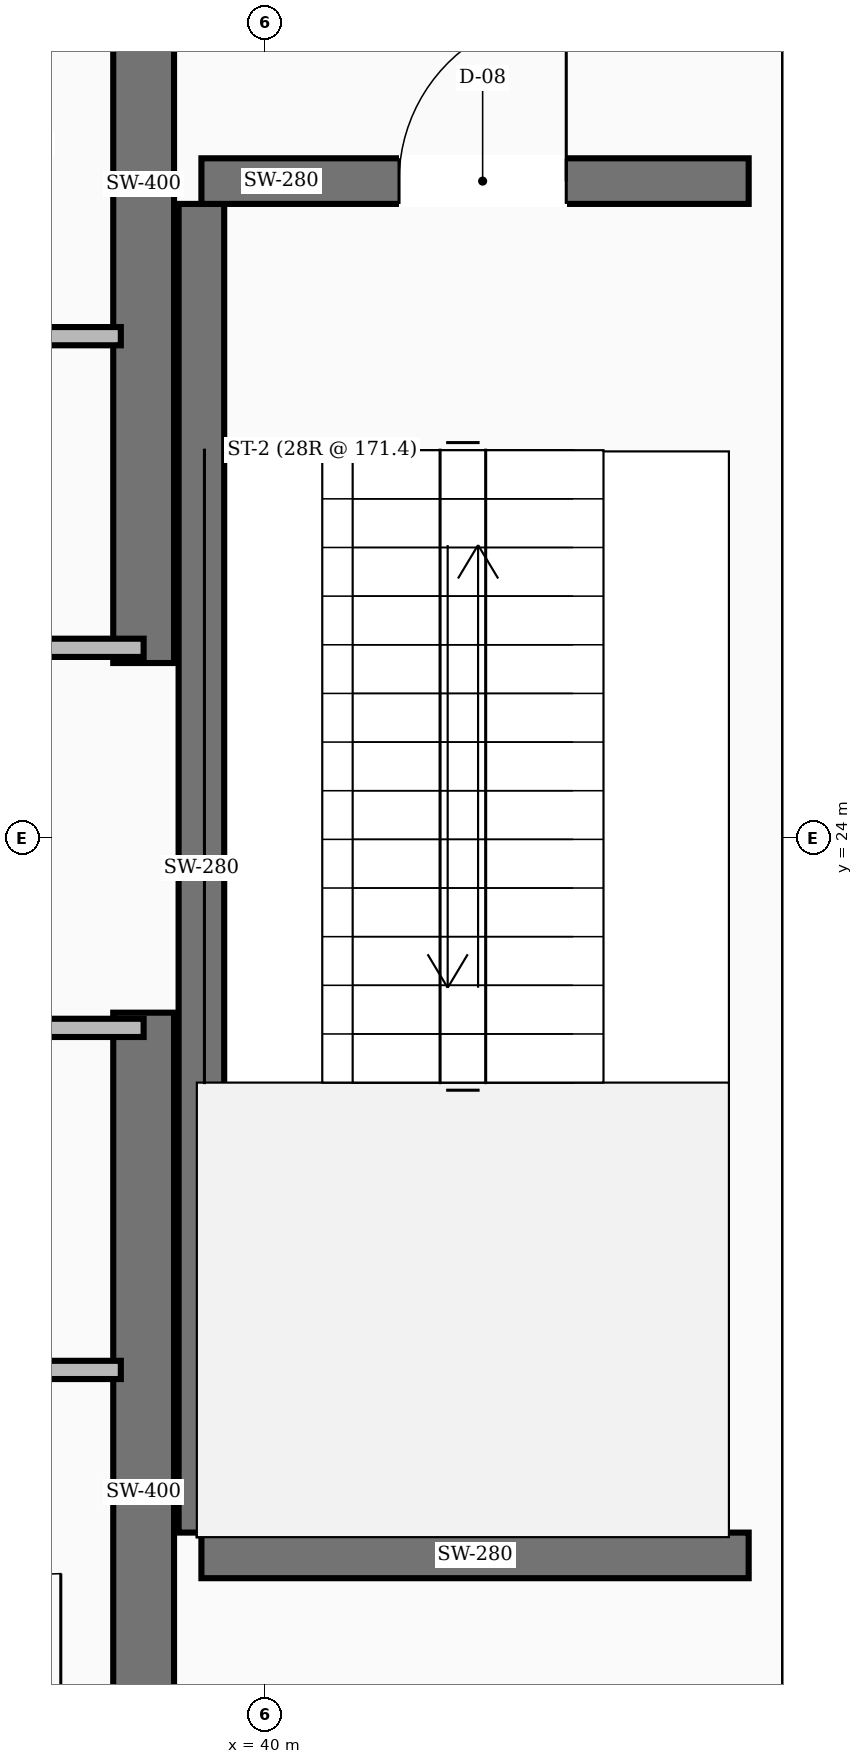
"""IFC4 building model, lengths in metres.
Left out: names, types, materials, properties, quantities, classifications, styles, units other than length and angle.
Written with IfcOpenShell. Run it as: python <this file> out.ifc"""

import sys

from ifc_helpers import new_model, si_unit, direction, frame, frame_2d, origin, place, context, subcontext, project, spatial, rectangle, extrude, element, fill, save


model = new_model("IFC4")
c1 = context("Model", 3, precision=1e-05, world=origin(), true_north=direction((0.0, 1.0)))
c2 = subcontext(c1, "Body", "Model", "MODEL_VIEW")
j1 = project(units=[si_unit("LENGTHUNIT", "METRE"), si_unit("PLANEANGLEUNIT", "RADIAN")], contexts=[c1])
p1 = place(None, origin())
s1 = spatial("IfcSite", under=j1, at=p1, CompositionType="ELEMENT")
p2 = place(p1, origin())
s2 = spatial("IfcBuilding", under=s1, at=p2, CompositionType="ELEMENT")
p3 = place(p2, frame((0.0, 0.0, 5.2)))
s3 = spatial("IfcBuildingStorey", under=s2, at=p3, CompositionType="ELEMENT", Elevation=5.2)
for number, where, z_axis, x_axis in (
    (1, (39.2, 16.55, 0.0), (0.0, 0.0, 1.0), (0.0, 1.0, 0.0)),
    (2, (39.2, 25.15, 0.0), (0.0, 0.0, 1.0), (0.0, 1.0, 0.0)),
):
    element("IfcWall", number, at=place(p3, frame(where, z_axis=z_axis, x_axis=x_axis)), inside=s3, PredefinedType="SHEAR", context=c2, shape_type="SweptSolid", body=[
        extrude(rectangle(XDim=6.3, YDim=0.4, at=frame_2d((3.15, 0.0))), origin(), (0.0, 0.0, 1.0), 4.8),
    ])
for number, where, z_axis, x_axis in (
    (3, (43.18, 19.43, 0.0), (0.0, 0.0, 1.0), (0.0, 1.0, 0.0)),
    (4, (39.58, 19.43, 0.0), (0.0, 0.0, 1.0), (0.0, 1.0, 0.0)),
):
    element("IfcWall", number, at=place(p3, frame(where, z_axis=z_axis, x_axis=x_axis)), inside=s3, PredefinedType="SHEAR", context=c2, shape_type="SweptSolid", body=[
        extrude(rectangle(XDim=8.74, YDim=0.3, at=frame_2d((4.37, 0.0))), origin(), (0.0, 0.0, 1.0), 4.8),
    ])
p4 = place(p3, frame((39.58, 19.28, 0.0), z_axis=(0.0, 0.0, 1.0), x_axis=(1.0, 0.0, 0.0)))
e5 = element("IfcWall", 5, at=p4, inside=s3, PredefinedType="SHEAR", context=c2, shape_type="SweptSolid", body=[
    extrude(rectangle(XDim=3.6, YDim=0.3, at=frame_2d((1.8, 0.0))), origin(), (0.0, 0.0, 1.0), 4.8),
])
p5 = place(p3, frame((39.58, 28.32, 0.0), z_axis=(0.0, 0.0, 1.0), x_axis=(1.0, 0.0, 0.0)))
e6 = element("IfcWall", 6, at=p5, inside=s3, PredefinedType="SHEAR", context=c2, shape_type="SweptSolid", body=[
    extrude(rectangle(XDim=3.6, YDim=0.3, at=frame_2d((1.8, 0.0))), origin(), (0.0, 0.0, 1.0), 4.8),
])
p6 = place(p5, frame((1.3, 0.0, 0.0)))
e7 = element("IfcOpeningElement", 7, at=p6, cuts=e6, PredefinedType="OPENING", context=c2, shape_type="SweptSolid", body=[
    extrude(rectangle(XDim=1.1, YDim=2.1, at=frame_2d((0.55, 1.05))), frame((0.0, 0.16, 0.0), z_axis=(0.0, -1.0, 0.0), x_axis=(1.0, 0.0, 0.0)), (0.0, 0.0, 1.0), 0.32),
])
p7 = place(p3, frame((43.18, 28.32, 0.0), z_axis=(0.0, 0.0, 1.0), x_axis=(0.0, 1.0, 0.0)))
e8 = element("IfcWall", 8, at=p7, inside=s3, PredefinedType="SOLIDWALL", context=c2, shape_type="SweptSolid", body=[
    extrude(rectangle(XDim=3.13, YDim=0.2, at=frame_2d((1.565, 0.0))), origin(), (0.0, 0.0, 1.0), 3.52),
])
p8 = place(p7, frame((1.015, 0.0, 0.0)))
e9 = element("IfcOpeningElement", 9, at=p8, cuts=e8, PredefinedType="OPENING", context=c2, shape_type="SweptSolid", body=[
    extrude(rectangle(XDim=1.1, YDim=2.1, at=frame_2d((0.55, 1.05))), frame((0.0, 0.11, 0.0), z_axis=(0.0, -1.0, 0.0), x_axis=(1.0, 0.0, 0.0)), (0.0, 0.0, 1.0), 0.22),
])
p9 = place(p3, frame((43.18, 16.55, 0.0), z_axis=(0.0, 0.0, 1.0), x_axis=(0.0, 1.0, 0.0)))
e10 = element("IfcWall", 10, at=p9, inside=s3, PredefinedType="SOLIDWALL", context=c2, shape_type="SweptSolid", body=[
    extrude(rectangle(XDim=2.73, YDim=0.2, at=frame_2d((1.365, 0.0))), origin(), (0.0, 0.0, 1.0), 3.52),
])
p10 = place(p9, frame((0.89, 0.0, 0.0)))
e11 = element("IfcOpeningElement", 11, at=p10, cuts=e10, PredefinedType="OPENING", context=c2, shape_type="SweptSolid", body=[
    extrude(rectangle(XDim=0.95, YDim=2.1, at=frame_2d((0.475, 1.05))), frame((0.0, 0.11, 0.0), z_axis=(0.0, -1.0, 0.0), x_axis=(1.0, 0.0, 0.0)), (0.0, 0.0, 1.0), 0.22),
])
for number, where, z_axis, x_axis in (
    (12, (37.4, 25.25, 0.0), (0.0, 0.0, 1.0), (1.0, 0.0, 0.0)),
    (13, (37.4, 22.75, 0.0), (0.0, 0.0, 1.0), (1.0, 0.0, 0.0)),
):
    element("IfcWall", number, at=place(p3, frame(where, z_axis=z_axis, x_axis=x_axis)), inside=s3, PredefinedType="PARTITIONING", context=c2, shape_type="SweptSolid", body=[
        extrude(rectangle(XDim=1.8, YDim=0.12, at=frame_2d((0.9, 0.0))), origin(), (0.0, 0.0, 1.0), 3.52),
    ])
p11 = place(p6, origin())
e14 = element("IfcDoor", 14, at=p11, inside=s3, OperationType="SINGLE_SWING_RIGHT", PredefinedType="DOOR", context=c2, shape_type="SweptSolid", body=[
    extrude(rectangle(XDim=1.1, YDim=2.1, at=frame_2d((0.55, 1.05))), frame((0.0, 0.025, 0.0), z_axis=(0.0, -1.0, 0.0), x_axis=(1.0, 0.0, 0.0)), (0.0, 0.0, 1.0), 0.05),
])
fill(e7, e14)
save(model, sys.argv[1])
